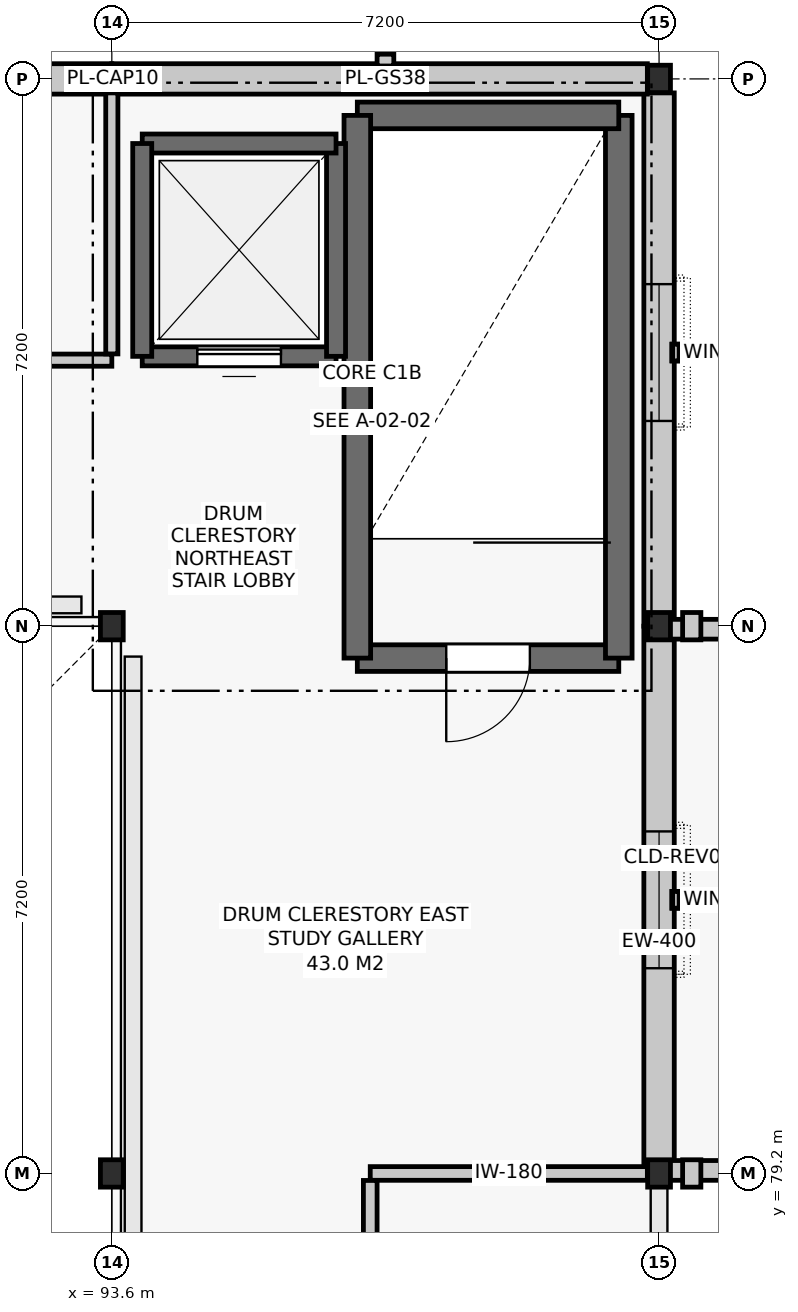
"""IFC4 building model, lengths in metres.
Left out: names, types, materials, properties, quantities, classifications, styles, units other than length and angle.
Written with IfcOpenShell. Run it as: python <this file> out.ifc"""

import sys

from ifc_helpers import new_model, si_unit, direction, frame, frame_2d, origin, origin_2d, place, context, subcontext, project, spatial, rectangle, i_section, extrude, element, fill, save


model = new_model("IFC4")
c1 = context("Model", 3, precision=1e-05, world=origin(), true_north=direction((0.0, 1.0)))
c2 = subcontext(c1, "Body", "Model", "MODEL_VIEW")
j1 = project(units=[si_unit("LENGTHUNIT", "METRE"), si_unit("PLANEANGLEUNIT", "RADIAN")], contexts=[c1])
p1 = place(None, origin())
s1 = spatial("IfcSite", under=j1, at=p1, CompositionType="ELEMENT")
p2 = place(p1, origin())
s2 = spatial("IfcBuilding", under=s1, at=p2, CompositionType="ELEMENT")
p3 = place(p2, frame((0.0, 0.0, 14.4)))
s3 = spatial("IfcBuildingStorey", under=s2, at=p3, CompositionType="ELEMENT", Elevation=14.4)
for number, where, z_axis, x_axis in (
    (1, (93.6, 79.2, 0.0), (0.0, 0.0, 1.0), (1.0, 0.0, 0.0)),
    (2, (93.6, 86.4, 0.0), (0.0, 0.0, 1.0), (1.0, 0.0, 0.0)),
    (3, (93.6, 93.6, 0.0), (0.0, 0.0, 1.0), (1.0, 0.0, 0.0)),
    (4, (100.8, 79.2, 0.0), (0.0, 0.0, 1.0), (1.0, 0.0, 0.0)),
    (5, (100.8, 86.4, 0.0), (0.0, 0.0, 1.0), (1.0, 0.0, 0.0)),
    (6, (100.8, 93.6, 0.0), (0.0, 0.0, 1.0), (1.0, 0.0, 0.0)),
):
    element("IfcColumn", number, at=place(p3, frame(where, z_axis=z_axis, x_axis=x_axis)), inside=s3, PredefinedType="COLUMN", context=c2, shape_type="SweptSolid", body=[
        extrude(i_section(OverallWidth=0.3, OverallDepth=0.36, WebThickness=0.012, FlangeThickness=0.022, FilletRadius=0.027, at=origin_2d()), origin(), (0.0, 0.0, 1.0), 4.2),
    ])
p4 = place(p3, frame((100.8, 79.2, 0.0), z_axis=(0.0, 0.0, 1.0), x_axis=(0.0, 1.0, 0.0)))
e7 = element("IfcWall", 7, at=p4, inside=s3, PredefinedType="SOLIDWALL", context=c2, shape_type="SweptSolid", body=[
    extrude(rectangle(XDim=7.2, YDim=0.4, at=frame_2d((3.6, 0.0))), origin(), (0.0, 0.0, 1.0), 3.24),
])
p5 = place(p4, frame((2.7, 0.0, 0.95)))
e8 = element("IfcOpeningElement", 8, at=p5, cuts=e7, PredefinedType="OPENING", context=c2, shape_type="SweptSolid", body=[
    extrude(rectangle(XDim=1.8, YDim=2.05, at=frame_2d((0.9, 1.025))), frame((0.0, 0.212, 0.0), z_axis=(0.0, -1.0, 0.0), x_axis=(1.0, 0.0, 0.0)), (0.0, 0.0, 1.0), 0.424),
])
p6 = place(p3, frame((100.8, 86.4, 0.0), z_axis=(0.0, 0.0, 1.0), x_axis=(0.0, 1.0, 0.0)))
e9 = element("IfcWall", 9, at=p6, inside=s3, PredefinedType="SOLIDWALL", context=c2, shape_type="SweptSolid", body=[
    extrude(rectangle(XDim=7.016, YDim=0.4, at=frame_2d((3.508, 0.0))), origin(), (0.0, 0.0, 1.0), 3.24),
])
p7 = place(p6, frame((2.7, 0.0, 0.95)))
e10 = element("IfcOpeningElement", 10, at=p7, cuts=e9, PredefinedType="OPENING", context=c2, shape_type="SweptSolid", body=[
    extrude(rectangle(XDim=1.8, YDim=2.05, at=frame_2d((0.9, 1.025))), frame((0.0, 0.212, 0.0), z_axis=(0.0, -1.0, 0.0), x_axis=(1.0, 0.0, 0.0)), (0.0, 0.0, 1.0), 0.424),
])
p8 = place(p3, frame((100.646, 93.6, 0.0), z_axis=(0.0, 0.0, 1.0), x_axis=(-1.0, 0.0, 0.0)))
e11 = element("IfcWall", 11, at=p8, inside=s3, PredefinedType="SOLIDWALL", context=c2, shape_type="SweptSolid", body=[
    extrude(rectangle(XDim=7.046, YDim=0.4, at=frame_2d((3.523, 0.0))), origin(), (0.0, 0.0, 1.0), 3.24),
])
p9 = place(p3, frame((93.6, 93.6, 0.0), z_axis=(0.0, 0.0, 1.0), x_axis=(-1.0, 0.0, 0.0)))
e12 = element("IfcWall", 12, at=p9, inside=s3, PredefinedType="SOLIDWALL", context=c2, shape_type="SweptSolid", body=[
    extrude(rectangle(XDim=7.2, YDim=0.4, at=frame_2d((3.6, 0.0))), origin(), (0.0, 0.0, 1.0), 3.24),
])
p10 = place(p9, frame((2.7, 0.0, 0.95)))
e13 = element("IfcOpeningElement", 13, at=p10, cuts=e12, PredefinedType="OPENING", context=c2, shape_type="SweptSolid", body=[
    extrude(rectangle(XDim=1.8, YDim=2.05, at=frame_2d((0.9, 1.025))), frame((0.0, 0.212, 0.0), z_axis=(0.0, -1.0, 0.0), x_axis=(1.0, 0.0, 0.0)), (0.0, 0.0, 1.0), 0.424),
])
for number, where, z_axis, x_axis in (
    (14, (100.84, 79.24, 0.0), (0.0, 0.0, 1.0), (1.0, 0.0, 0.0)),
    (15, (122.36, 86.36, 0.0), (0.0, 0.0, 1.0), (-1.0, 0.0, 0.0)),
):
    element("IfcWall", number, at=place(p3, frame(where, z_axis=z_axis, x_axis=x_axis)), inside=s3, PredefinedType="PARAPET", context=c2, shape_type="SweptSolid", body=[
        extrude(rectangle(XDim=21.52, YDim=0.26, at=frame_2d((10.76, 0.0))), origin(), (0.0, 0.0, 1.0), 0.9),
    ])
p11 = place(p3, frame((96.83, 85.98, 0.0), z_axis=(0.0, 0.0, 1.0), x_axis=(1.0, 0.0, 0.0)))
e16 = element("IfcWall", 16, at=p11, inside=s3, PredefinedType="SHEAR", context=c2, shape_type="SweptSolid", body=[
    extrude(rectangle(XDim=3.44, YDim=0.35, at=frame_2d((1.72, 0.0))), origin(), (0.0, 0.0, 1.0), 3.96),
])
p12 = place(p11, frame((1.17, 0.0, 0.0)))
e17 = element("IfcOpeningElement", 17, at=p12, cuts=e16, PredefinedType="OPENING", context=c2, shape_type="SweptSolid", body=[
    extrude(rectangle(XDim=1.1, YDim=2.15, at=frame_2d((0.55, 1.075))), frame((0.0, 0.187, 0.0), z_axis=(0.0, -1.0, 0.0), x_axis=(1.0, 0.0, 0.0)), (0.0, 0.0, 1.0), 0.374),
])
p13 = place(p3, frame((100.27, 85.98, 0.0), z_axis=(0.0, 0.0, 1.0), x_axis=(0.0, 1.0, 0.0)))
e18 = element("IfcWall", 18, at=p13, inside=s3, PredefinedType="SHEAR", context=c2, shape_type="SweptSolid", body=[
    extrude(rectangle(XDim=7.14, YDim=0.35, at=frame_2d((3.57, 0.0))), origin(), (0.0, 0.0, 1.0), 3.96),
])
p14 = place(p3, frame((100.27, 93.12, 0.0), z_axis=(0.0, 0.0, 1.0), x_axis=(-1.0, 0.0, 0.0)))
e19 = element("IfcWall", 19, at=p14, inside=s3, PredefinedType="SHEAR", context=c2, shape_type="SweptSolid", body=[
    extrude(rectangle(XDim=3.44, YDim=0.35, at=frame_2d((1.72, 0.0))), origin(), (0.0, 0.0, 1.0), 3.96),
])
p15 = place(p3, frame((96.83, 93.12, 0.0), z_axis=(0.0, 0.0, 1.0), x_axis=(0.0, -1.0, 0.0)))
e20 = element("IfcWall", 20, at=p15, inside=s3, PredefinedType="SHEAR", context=c2, shape_type="SweptSolid", body=[
    extrude(rectangle(XDim=7.14, YDim=0.35, at=frame_2d((3.57, 0.0))), origin(), (0.0, 0.0, 1.0), 3.96),
])
p16 = place(p3, frame((94.0, 89.95, 0.0), z_axis=(0.0, 0.0, 1.0), x_axis=(1.0, 0.0, 0.0)))
e21 = element("IfcWall", 21, at=p16, inside=s3, PredefinedType="SHEAR", context=c2, shape_type="SweptSolid", body=[
    extrude(rectangle(XDim=2.55, YDim=0.25, at=frame_2d((1.275, 0.0))), origin(), (0.0, 0.0, 1.0), 3.96),
])
p17 = place(p16, frame((0.725, 0.0, 0.0)))
e22 = element("IfcOpeningElement", 22, at=p17, cuts=e21, PredefinedType="OPENING", context=c2, shape_type="SweptSolid", body=[
    extrude(rectangle(XDim=1.1, YDim=2.1, at=frame_2d((0.55, 1.05))), frame((0.0, 0.137, 0.0), z_axis=(0.0, -1.0, 0.0), x_axis=(1.0, 0.0, 0.0)), (0.0, 0.0, 1.0), 0.274),
])
p18 = place(p3, frame((96.55, 89.95, 0.0), z_axis=(0.0, 0.0, 1.0), x_axis=(0.0, 1.0, 0.0)))
e23 = element("IfcWall", 23, at=p18, inside=s3, PredefinedType="SHEAR", context=c2, shape_type="SweptSolid", body=[
    extrude(rectangle(XDim=2.8, YDim=0.25, at=frame_2d((1.4, 0.0))), origin(), (0.0, 0.0, 1.0), 3.96),
])
p19 = place(p3, frame((96.55, 92.75, 0.0), z_axis=(0.0, 0.0, 1.0), x_axis=(-1.0, 0.0, 0.0)))
e24 = element("IfcWall", 24, at=p19, inside=s3, PredefinedType="SHEAR", context=c2, shape_type="SweptSolid", body=[
    extrude(rectangle(XDim=2.55, YDim=0.25, at=frame_2d((1.275, 0.0))), origin(), (0.0, 0.0, 1.0), 3.96),
])
p20 = place(p3, frame((94.0, 92.75, 0.0), z_axis=(0.0, 0.0, 1.0), x_axis=(0.0, -1.0, 0.0)))
e25 = element("IfcWall", 25, at=p20, inside=s3, PredefinedType="SHEAR", context=c2, shape_type="SweptSolid", body=[
    extrude(rectangle(XDim=2.8, YDim=0.25, at=frame_2d((1.4, 0.0))), origin(), (0.0, 0.0, 1.0), 3.96),
])
p21 = place(p3, frame((97.0, 79.2, 0.0), z_axis=(0.0, 0.0, 1.0), x_axis=(1.0, 0.0, 0.0)))
e26 = element("IfcWall", 26, at=p21, inside=s3, PredefinedType="PARTITIONING", context=c2, shape_type="SweptSolid", body=[
    extrude(rectangle(XDim=3.646, YDim=0.18, at=frame_2d((1.823, 0.0))), origin(), (0.0, 0.0, 1.0), 3.135),
])
p22 = place(p3, frame((69.202, 89.9, 0.0), z_axis=(0.0, 0.0, 1.0), x_axis=(1.0, 0.0, 0.0)))
e27 = element("IfcWall", 27, at=p22, inside=s3, PredefinedType="PARTITIONING", context=c2, shape_type="SweptSolid", body=[
    extrude(rectangle(XDim=24.398, YDim=0.16, at=frame_2d((12.199, 0.0))), origin(), (0.0, 0.0, 1.0), 3.135),
])
p23 = place(p22, frame((11.699, 0.0, 0.0)))
e28 = element("IfcOpeningElement", 28, at=p23, cuts=e27, PredefinedType="OPENING", context=c2, shape_type="SweptSolid", body=[
    extrude(rectangle(XDim=1.0, YDim=2.15, at=frame_2d((0.5, 1.075))), frame((0.0, 0.092, 0.0), z_axis=(0.0, -1.0, 0.0), x_axis=(1.0, 0.0, 0.0)), (0.0, 0.0, 1.0), 0.184),
])
p24 = place(p3, frame((97.0, 61.282, 0.0), z_axis=(0.0, 0.0, 1.0), x_axis=(0.0, 1.0, 0.0)))
e29 = element("IfcWall", 29, at=p24, inside=s3, PredefinedType="PARTITIONING", context=c2, shape_type="SweptSolid", body=[
    extrude(rectangle(XDim=17.826, YDim=0.18, at=frame_2d((8.913, 0.0))), origin(), (0.0, 0.0, 1.0), 3.585),
])
p25 = place(p24, frame((9.727, 0.0, 0.0)))
e30 = element("IfcOpeningElement", 30, at=p25, cuts=e29, PredefinedType="OPENING", context=c2, shape_type="SweptSolid", body=[
    extrude(rectangle(XDim=1.65, YDim=2.25, at=frame_2d((0.825, 1.125))), frame((0.0, 0.102, 0.0), z_axis=(0.0, -1.0, 0.0), x_axis=(1.0, 0.0, 0.0)), (0.0, 0.0, 1.0), 0.204),
])
p26 = place(p3, frame((93.6, 89.982, 0.0), z_axis=(0.0, 0.0, 1.0), x_axis=(0.0, 1.0, 0.0)))
e31 = element("IfcWall", 31, at=p26, inside=s3, PredefinedType="PARTITIONING", context=c2, shape_type="SweptSolid", body=[
    extrude(rectangle(XDim=3.434, YDim=0.16, at=frame_2d((1.717, 0.0))), origin(), (0.0, 0.0, 1.0), 3.595),
])
p27 = place(p5, origin())
e32 = element("IfcWindow", 32, at=p27, inside=s3, PartitioningType="SINGLE_PANEL", PredefinedType="WINDOW", context=c2, shape_type="SweptSolid", body=[
    extrude(rectangle(XDim=1.8, YDim=2.05, at=frame_2d((0.9, 1.025))), frame((0.0, 0.03, 0.0), z_axis=(0.0, -1.0, 0.0), x_axis=(1.0, 0.0, 0.0)), (0.0, 0.0, 1.0), 0.06),
])
fill(e8, e32)
p28 = place(p7, origin())
e33 = element("IfcWindow", 33, at=p28, inside=s3, PartitioningType="SINGLE_PANEL", PredefinedType="WINDOW", context=c2, shape_type="SweptSolid", body=[
    extrude(rectangle(XDim=1.8, YDim=2.05, at=frame_2d((0.9, 1.025))), frame((0.0, 0.03, 0.0), z_axis=(0.0, -1.0, 0.0), x_axis=(1.0, 0.0, 0.0)), (0.0, 0.0, 1.0), 0.06),
])
fill(e10, e33)
p29 = place(p12, frame((1.1, 0.0, 0.0), z_axis=(0.0, 0.0, 1.0), x_axis=(-1.0, 0.0, 0.0)))
e34 = element("IfcDoor", 34, at=p29, inside=s3, OperationType="SINGLE_SWING_RIGHT", PredefinedType="DOOR", context=c2, shape_type="SweptSolid", body=[
    extrude(rectangle(XDim=1.1, YDim=2.15, at=frame_2d((0.55, 1.075))), frame((0.0, 0.025, 0.0), z_axis=(0.0, -1.0, 0.0), x_axis=(1.0, 0.0, 0.0)), (0.0, 0.0, 1.0), 0.05),
])
fill(e17, e34)
p30 = place(p17, origin())
e35 = element("IfcDoor", 35, at=p30, inside=s3, OperationType="SLIDING_TO_LEFT", PredefinedType="DOOR", context=c2, shape_type="SweptSolid", body=[
    extrude(rectangle(XDim=1.1, YDim=2.1, at=frame_2d((0.55, 1.05))), frame((0.0, 0.025, 0.0), z_axis=(0.0, -1.0, 0.0), x_axis=(1.0, 0.0, 0.0)), (0.0, 0.0, 1.0), 0.05),
])
fill(e22, e35)
save(model, sys.argv[1])
